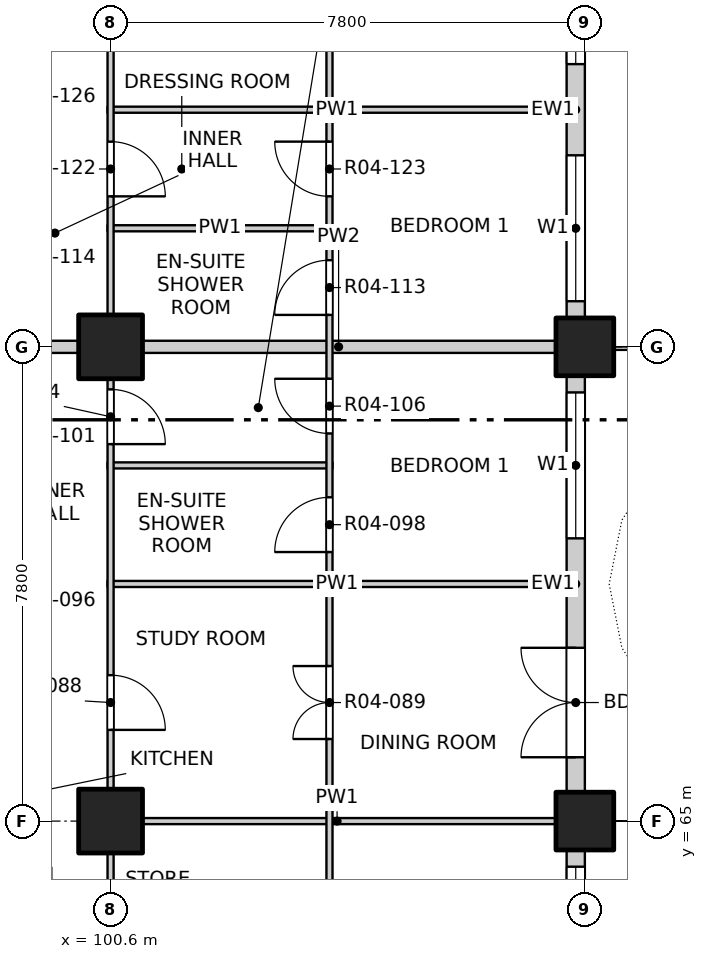
"""IFC4 building model, lengths in metres.
Left out: names, types, materials, properties, quantities, classifications, styles, units other than length and angle.
Written with IfcOpenShell. Run it as: python <this file> out.ifc"""

import sys

from ifc_helpers import new_model, si_unit, direction, frame, frame_2d, origin, origin_2d, place, context, subcontext, project, spatial, rectangle, extrude, element, fill, save


model = new_model("IFC4")
c1 = context("Model", 3, precision=1e-05, world=origin(), true_north=direction((0.0, 1.0)))
c2 = subcontext(c1, "Body", "Model", "MODEL_VIEW")
j1 = project(units=[si_unit("LENGTHUNIT", "METRE"), si_unit("PLANEANGLEUNIT", "RADIAN")], contexts=[c1])
p1 = place(None, origin())
s1 = spatial("IfcSite", under=j1, at=p1, CompositionType="ELEMENT")
p2 = place(p1, origin())
s2 = spatial("IfcBuilding", under=s1, at=p2, CompositionType="ELEMENT")
p3 = place(p2, frame((0.0, 0.0, 58.0)))
s3 = spatial("IfcBuildingStorey", under=s2, at=p3, CompositionType="ELEMENT", Elevation=58.0)
for number, where, z_axis, x_axis in (
    (1, (108.4, 65.0, -0.25), (0.0, 0.0, 1.0), (1.0, 0.0, 0.0)),
    (2, (108.4, 72.8, -0.25), (0.0, 0.0, 1.0), (1.0, 0.0, 0.0)),
):
    element("IfcColumn", number, at=place(p3, frame(where, z_axis=z_axis, x_axis=x_axis)), inside=s3, PredefinedType="COLUMN", context=c2, shape_type="SweptSolid", body=[
        extrude(rectangle(XDim=0.95, YDim=0.95, at=origin_2d()), origin(), (0.0, 0.0, 1.0), 3.4),
    ])
for number, where, z_axis, x_axis in (
    (3, (100.6, 65.0, -0.25), (0.0, 0.0, 1.0), (1.0, 0.0, 0.0)),
    (4, (100.6, 72.8, -0.25), (0.0, 0.0, 1.0), (1.0, 0.0, 0.0)),
):
    element("IfcColumn", number, at=place(p3, frame(where, z_axis=z_axis, x_axis=x_axis)), inside=s3, PredefinedType="COLUMN", context=c2, shape_type="SweptSolid", body=[
        extrude(rectangle(XDim=1.05, YDim=1.05, at=origin_2d()), origin(), (0.0, 0.0, 1.0), 3.4),
    ])
p4 = place(p3, frame((108.25, 57.675, 0.0), z_axis=(0.0, 0.0, 1.0), x_axis=(0.0, 1.0, 0.0)))
e5 = element("IfcWall", 5, at=p4, inside=s3, PredefinedType="SOLIDWALL", context=c2, shape_type="SweptSolid", body=[
    extrude(rectangle(XDim=6.85, YDim=0.3, at=frame_2d((3.425, 0.0))), origin(), (0.0, 0.0, 1.0), 2.7),
])
p5 = place(p4, frame((0.575, 0.0, 0.0)))
e6 = element("IfcOpeningElement", 6, at=p5, cuts=e5, PredefinedType="OPENING", context=c2, shape_type="SweptSolid", body=[
    extrude(rectangle(XDim=1.8, YDim=2.4, at=frame_2d((0.9, 1.2))), frame((0.0, 0.16, 0.0), z_axis=(0.0, -1.0, 0.0), x_axis=(1.0, 0.0, 0.0)), (0.0, 0.0, 1.0), 0.32),
])
p6 = place(p4, frame((4.175, 0.0, 0.9)))
e7 = element("IfcOpeningElement", 7, at=p6, cuts=e5, PredefinedType="OPENING", context=c2, shape_type="SweptSolid", body=[
    extrude(rectangle(XDim=2.4, YDim=1.8, at=frame_2d((1.2, 0.9))), frame((0.0, 0.16, 0.0), z_axis=(0.0, -1.0, 0.0), x_axis=(1.0, 0.0, 0.0)), (0.0, 0.0, 1.0), 0.32),
])
p7 = place(p3, frame((108.25, 65.475, 0.0), z_axis=(0.0, 0.0, 1.0), x_axis=(0.0, 1.0, 0.0)))
e8 = element("IfcWall", 8, at=p7, inside=s3, PredefinedType="SOLIDWALL", context=c2, shape_type="SweptSolid", body=[
    extrude(rectangle(XDim=6.85, YDim=0.3, at=frame_2d((3.425, 0.0))), origin(), (0.0, 0.0, 1.0), 2.7),
])
p8 = place(p7, frame((0.575, 0.0, 0.0)))
e9 = element("IfcOpeningElement", 9, at=p8, cuts=e8, PredefinedType="OPENING", context=c2, shape_type="SweptSolid", body=[
    extrude(rectangle(XDim=1.8, YDim=2.4, at=frame_2d((0.9, 1.2))), frame((0.0, 0.16, 0.0), z_axis=(0.0, -1.0, 0.0), x_axis=(1.0, 0.0, 0.0)), (0.0, 0.0, 1.0), 0.32),
])
p9 = place(p7, frame((4.175, 0.0, 0.9)))
e10 = element("IfcOpeningElement", 10, at=p9, cuts=e8, PredefinedType="OPENING", context=c2, shape_type="SweptSolid", body=[
    extrude(rectangle(XDim=2.4, YDim=1.8, at=frame_2d((1.2, 0.9))), frame((0.0, 0.16, 0.0), z_axis=(0.0, -1.0, 0.0), x_axis=(1.0, 0.0, 0.0)), (0.0, 0.0, 1.0), 0.32),
])
p10 = place(p3, frame((108.25, 73.275, 0.0), z_axis=(0.0, 0.0, 1.0), x_axis=(0.0, 1.0, 0.0)))
e11 = element("IfcWall", 11, at=p10, inside=s3, PredefinedType="SOLIDWALL", context=c2, shape_type="SweptSolid", body=[
    extrude(rectangle(XDim=6.85, YDim=0.3, at=frame_2d((3.425, 0.0))), origin(), (0.0, 0.0, 1.0), 2.7),
])
p11 = place(p10, frame((0.275, 0.0, 0.9)))
e12 = element("IfcOpeningElement", 12, at=p11, cuts=e11, PredefinedType="OPENING", context=c2, shape_type="SweptSolid", body=[
    extrude(rectangle(XDim=2.4, YDim=1.8, at=frame_2d((1.2, 0.9))), frame((0.0, 0.16, 0.0), z_axis=(0.0, -1.0, 0.0), x_axis=(1.0, 0.0, 0.0)), (0.0, 0.0, 1.0), 0.32),
])
p12 = place(p10, frame((4.175, 0.0, 0.9)))
e13 = element("IfcOpeningElement", 13, at=p12, cuts=e11, PredefinedType="OPENING", context=c2, shape_type="SweptSolid", body=[
    extrude(rectangle(XDim=2.4, YDim=1.8, at=frame_2d((1.2, 0.9))), frame((0.0, 0.16, 0.0), z_axis=(0.0, -1.0, 0.0), x_axis=(1.0, 0.0, 0.0)), (0.0, 0.0, 1.0), 0.32),
])
p13 = place(p3, frame((100.55, 65.0, 0.0), z_axis=(0.0, 0.0, 1.0), x_axis=(1.0, 0.0, 0.0)))
e14 = element("IfcWall", 14, at=p13, inside=s3, PredefinedType="PARTITIONING", context=c2, shape_type="SweptSolid", body=[
    extrude(rectangle(XDim=7.55, YDim=0.1, at=frame_2d((3.775, 0.0))), origin(), (0.0, 0.0, 1.0), 2.55),
])
p14 = place(p3, frame((100.55, 68.9, 0.0), z_axis=(0.0, 0.0, 1.0), x_axis=(1.0, 0.0, 0.0)))
e15 = element("IfcWall", 15, at=p14, inside=s3, PredefinedType="PARTITIONING", context=c2, shape_type="SweptSolid", body=[
    extrude(rectangle(XDim=7.55, YDim=0.1, at=frame_2d((3.775, 0.0))), origin(), (0.0, 0.0, 1.0), 3.15),
])
p15 = place(p3, frame((100.55, 70.85, 0.0), z_axis=(0.0, 0.0, 1.0), x_axis=(1.0, 0.0, 0.0)))
e16 = element("IfcWall", 16, at=p15, inside=s3, PredefinedType="PARTITIONING", context=c2, shape_type="SweptSolid", body=[
    extrude(rectangle(XDim=3.7, YDim=0.1, at=frame_2d((1.85, 0.0))), origin(), (0.0, 0.0, 1.0), 3.15),
])
p16 = place(p3, frame((96.6, 72.8, 0.0), z_axis=(0.0, 0.0, 1.0), x_axis=(1.0, 0.0, 0.0)))
e17 = element("IfcWall", 17, at=p16, inside=s3, PredefinedType="PARTITIONING", context=c2, shape_type="SweptSolid", body=[
    extrude(rectangle(XDim=4.0, YDim=0.2, at=frame_2d((2.0, 0.0))), origin(), (0.0, 0.0, 1.0), 3.15),
])
p17 = place(p3, frame((100.6, 72.8, 0.0), z_axis=(0.0, 0.0, 1.0), x_axis=(1.0, 0.0, 0.0)))
e18 = element("IfcWall", 18, at=p17, inside=s3, PredefinedType="PARTITIONING", context=c2, shape_type="SweptSolid", body=[
    extrude(rectangle(XDim=7.5, YDim=0.2, at=frame_2d((3.75, 0.0))), origin(), (0.0, 0.0, 1.0), 2.55),
])
p18 = place(p3, frame((100.55, 74.75, 0.0), z_axis=(0.0, 0.0, 1.0), x_axis=(1.0, 0.0, 0.0)))
e19 = element("IfcWall", 19, at=p18, inside=s3, PredefinedType="PARTITIONING", context=c2, shape_type="SweptSolid", body=[
    extrude(rectangle(XDim=3.7, YDim=0.1, at=frame_2d((1.85, 0.0))), origin(), (0.0, 0.0, 1.0), 3.15),
])
p19 = place(p3, frame((100.55, 76.7, 0.0), z_axis=(0.0, 0.0, 1.0), x_axis=(1.0, 0.0, 0.0)))
e20 = element("IfcWall", 20, at=p19, inside=s3, PredefinedType="PARTITIONING", context=c2, shape_type="SweptSolid", body=[
    extrude(rectangle(XDim=7.55, YDim=0.1, at=frame_2d((3.775, 0.0))), origin(), (0.0, 0.0, 1.0), 3.15),
])
p20 = place(p3, frame((100.6, 49.4, 0.0), z_axis=(0.0, 0.0, 1.0), x_axis=(0.0, 1.0, 0.0)))
e21 = element("IfcWall", 21, at=p20, inside=s3, PredefinedType="PARTITIONING", context=c2, shape_type="SweptSolid", body=[
    extrude(rectangle(XDim=31.2, YDim=0.1, at=frame_2d((15.6, 0.0))), origin(), (0.0, 0.0, 1.0), 3.15),
])
p21 = place(p20, frame((2.475, 0.0, 0.0)))
e22 = element("IfcOpeningElement", 22, at=p21, cuts=e21, PredefinedType="OPENING", context=c2, shape_type="SweptSolid", body=[
    extrude(rectangle(XDim=0.9, YDim=2.1, at=frame_2d((0.45, 1.05))), frame((0.0, 0.06, 0.0), z_axis=(0.0, -1.0, 0.0), x_axis=(1.0, 0.0, 0.0)), (0.0, 0.0, 1.0), 0.12),
])
p22 = place(p20, frame((5.4, 0.0, 0.0)))
e23 = element("IfcOpeningElement", 23, at=p22, cuts=e21, PredefinedType="OPENING", context=c2, shape_type="SweptSolid", body=[
    extrude(rectangle(XDim=0.9, YDim=2.1, at=frame_2d((0.45, 1.05))), frame((0.0, 0.06, 0.0), z_axis=(0.0, -1.0, 0.0), x_axis=(1.0, 0.0, 0.0)), (0.0, 0.0, 1.0), 0.12),
])
p23 = place(p20, frame((10.275, 0.0, 0.0)))
e24 = element("IfcOpeningElement", 24, at=p23, cuts=e21, PredefinedType="OPENING", context=c2, shape_type="SweptSolid", body=[
    extrude(rectangle(XDim=0.9, YDim=2.1, at=frame_2d((0.45, 1.05))), frame((0.0, 0.06, 0.0), z_axis=(0.0, -1.0, 0.0), x_axis=(1.0, 0.0, 0.0)), (0.0, 0.0, 1.0), 0.12),
])
p24 = place(p20, frame((13.2, 0.0, 0.0)))
e25 = element("IfcOpeningElement", 25, at=p24, cuts=e21, PredefinedType="OPENING", context=c2, shape_type="SweptSolid", body=[
    extrude(rectangle(XDim=0.9, YDim=2.1, at=frame_2d((0.45, 1.05))), frame((0.0, 0.06, 0.0), z_axis=(0.0, -1.0, 0.0), x_axis=(1.0, 0.0, 0.0)), (0.0, 0.0, 1.0), 0.12),
])
p25 = place(p20, frame((17.1, 0.0, 0.0)))
e26 = element("IfcOpeningElement", 26, at=p25, cuts=e21, PredefinedType="OPENING", context=c2, shape_type="SweptSolid", body=[
    extrude(rectangle(XDim=0.9, YDim=2.1, at=frame_2d((0.45, 1.05))), frame((0.0, 0.06, 0.0), z_axis=(0.0, -1.0, 0.0), x_axis=(1.0, 0.0, 0.0)), (0.0, 0.0, 1.0), 0.12),
])
p26 = place(p20, frame((21.8, 0.0, 0.0)))
e27 = element("IfcOpeningElement", 27, at=p26, cuts=e21, PredefinedType="OPENING", context=c2, shape_type="SweptSolid", body=[
    extrude(rectangle(XDim=0.9, YDim=2.1, at=frame_2d((0.45, 1.05))), frame((0.0, 0.06, 0.0), z_axis=(0.0, -1.0, 0.0), x_axis=(1.0, 0.0, 0.0)), (0.0, 0.0, 1.0), 0.12),
])
p27 = place(p20, frame((25.875, 0.0, 0.0)))
e28 = element("IfcOpeningElement", 28, at=p27, cuts=e21, PredefinedType="OPENING", context=c2, shape_type="SweptSolid", body=[
    extrude(rectangle(XDim=0.9, YDim=2.1, at=frame_2d((0.45, 1.05))), frame((0.0, 0.06, 0.0), z_axis=(0.0, -1.0, 0.0), x_axis=(1.0, 0.0, 0.0)), (0.0, 0.0, 1.0), 0.12),
])
p28 = place(p20, frame((28.8, 0.0, 0.0)))
e29 = element("IfcOpeningElement", 29, at=p28, cuts=e21, PredefinedType="OPENING", context=c2, shape_type="SweptSolid", body=[
    extrude(rectangle(XDim=0.9, YDim=2.1, at=frame_2d((0.45, 1.05))), frame((0.0, 0.06, 0.0), z_axis=(0.0, -1.0, 0.0), x_axis=(1.0, 0.0, 0.0)), (0.0, 0.0, 1.0), 0.12),
])
p29 = place(p3, frame((104.2, 41.9, 0.0), z_axis=(0.0, 0.0, 1.0), x_axis=(0.0, 1.0, 0.0)))
e30 = element("IfcWall", 30, at=p29, inside=s3, PredefinedType="PARTITIONING", context=c2, shape_type="SweptSolid", body=[
    extrude(rectangle(XDim=46.2, YDim=0.1, at=frame_2d((23.1, 0.0))), origin(), (0.0, 0.0, 1.0), 3.15),
])
p30 = place(p29, frame((1.05, 0.0, 0.0)))
e31 = element("IfcOpeningElement", 31, at=p30, cuts=e30, PredefinedType="OPENING", context=c2, shape_type="SweptSolid", body=[
    extrude(rectangle(XDim=1.2, YDim=2.1, at=frame_2d((0.6, 1.05))), frame((0.0, 0.06, 0.0), z_axis=(0.0, -1.0, 0.0), x_axis=(1.0, 0.0, 0.0)), (0.0, 0.0, 1.0), 0.12),
])
p31 = place(p29, frame((4.125, 0.0, 0.0)))
e32 = element("IfcOpeningElement", 32, at=p31, cuts=e30, PredefinedType="OPENING", context=c2, shape_type="SweptSolid", body=[
    extrude(rectangle(XDim=0.9, YDim=2.1, at=frame_2d((0.45, 1.05))), frame((0.0, 0.06, 0.0), z_axis=(0.0, -1.0, 0.0), x_axis=(1.0, 0.0, 0.0)), (0.0, 0.0, 1.0), 0.12),
])
p32 = place(p29, frame((6.075, 0.0, 0.0)))
e33 = element("IfcOpeningElement", 33, at=p32, cuts=e30, PredefinedType="OPENING", context=c2, shape_type="SweptSolid", body=[
    extrude(rectangle(XDim=0.9, YDim=2.1, at=frame_2d((0.45, 1.05))), frame((0.0, 0.06, 0.0), z_axis=(0.0, -1.0, 0.0), x_axis=(1.0, 0.0, 0.0)), (0.0, 0.0, 1.0), 0.12),
])
p33 = place(p29, frame((8.025, 0.0, 0.0)))
e34 = element("IfcOpeningElement", 34, at=p33, cuts=e30, PredefinedType="OPENING", context=c2, shape_type="SweptSolid", body=[
    extrude(rectangle(XDim=0.9, YDim=2.1, at=frame_2d((0.45, 1.05))), frame((0.0, 0.06, 0.0), z_axis=(0.0, -1.0, 0.0), x_axis=(1.0, 0.0, 0.0)), (0.0, 0.0, 1.0), 0.12),
])
p34 = place(p29, frame((9.975, 0.0, 0.0)))
e35 = element("IfcOpeningElement", 35, at=p34, cuts=e30, PredefinedType="OPENING", context=c2, shape_type="SweptSolid", body=[
    extrude(rectangle(XDim=0.9, YDim=2.1, at=frame_2d((0.45, 1.05))), frame((0.0, 0.06, 0.0), z_axis=(0.0, -1.0, 0.0), x_axis=(1.0, 0.0, 0.0)), (0.0, 0.0, 1.0), 0.12),
])
p35 = place(p29, frame((12.75, 0.0, 0.0)))
e36 = element("IfcOpeningElement", 36, at=p35, cuts=e30, PredefinedType="OPENING", context=c2, shape_type="SweptSolid", body=[
    extrude(rectangle(XDim=1.2, YDim=2.1, at=frame_2d((0.6, 1.05))), frame((0.0, 0.06, 0.0), z_axis=(0.0, -1.0, 0.0), x_axis=(1.0, 0.0, 0.0)), (0.0, 0.0, 1.0), 0.12),
])
p36 = place(p29, frame((15.825, 0.0, 0.0)))
e37 = element("IfcOpeningElement", 37, at=p36, cuts=e30, PredefinedType="OPENING", context=c2, shape_type="SweptSolid", body=[
    extrude(rectangle(XDim=0.9, YDim=2.1, at=frame_2d((0.45, 1.05))), frame((0.0, 0.06, 0.0), z_axis=(0.0, -1.0, 0.0), x_axis=(1.0, 0.0, 0.0)), (0.0, 0.0, 1.0), 0.12),
])
p37 = place(p29, frame((17.775, 0.0, 0.0)))
e38 = element("IfcOpeningElement", 38, at=p37, cuts=e30, PredefinedType="OPENING", context=c2, shape_type="SweptSolid", body=[
    extrude(rectangle(XDim=0.9, YDim=2.1, at=frame_2d((0.45, 1.05))), frame((0.0, 0.06, 0.0), z_axis=(0.0, -1.0, 0.0), x_axis=(1.0, 0.0, 0.0)), (0.0, 0.0, 1.0), 0.12),
])
p38 = place(p29, frame((20.55, 0.0, 0.0)))
e39 = element("IfcOpeningElement", 39, at=p38, cuts=e30, PredefinedType="OPENING", context=c2, shape_type="SweptSolid", body=[
    extrude(rectangle(XDim=1.2, YDim=2.1, at=frame_2d((0.6, 1.05))), frame((0.0, 0.06, 0.0), z_axis=(0.0, -1.0, 0.0), x_axis=(1.0, 0.0, 0.0)), (0.0, 0.0, 1.0), 0.12),
])
p39 = place(p29, frame((24.45, 0.0, 0.0)))
e40 = element("IfcOpeningElement", 40, at=p39, cuts=e30, PredefinedType="OPENING", context=c2, shape_type="SweptSolid", body=[
    extrude(rectangle(XDim=1.2, YDim=2.1, at=frame_2d((0.6, 1.05))), frame((0.0, 0.06, 0.0), z_axis=(0.0, -1.0, 0.0), x_axis=(1.0, 0.0, 0.0)), (0.0, 0.0, 1.0), 0.12),
])
p40 = place(p29, frame((27.525, 0.0, 0.0)))
e41 = element("IfcOpeningElement", 41, at=p40, cuts=e30, PredefinedType="OPENING", context=c2, shape_type="SweptSolid", body=[
    extrude(rectangle(XDim=0.9, YDim=2.1, at=frame_2d((0.45, 1.05))), frame((0.0, 0.06, 0.0), z_axis=(0.0, -1.0, 0.0), x_axis=(1.0, 0.0, 0.0)), (0.0, 0.0, 1.0), 0.12),
])
p41 = place(p29, frame((29.475, 0.0, 0.0)))
e42 = element("IfcOpeningElement", 42, at=p41, cuts=e30, PredefinedType="OPENING", context=c2, shape_type="SweptSolid", body=[
    extrude(rectangle(XDim=0.9, YDim=2.1, at=frame_2d((0.45, 1.05))), frame((0.0, 0.06, 0.0), z_axis=(0.0, -1.0, 0.0), x_axis=(1.0, 0.0, 0.0)), (0.0, 0.0, 1.0), 0.12),
])
p42 = place(p29, frame((31.425, 0.0, 0.0)))
e43 = element("IfcOpeningElement", 43, at=p42, cuts=e30, PredefinedType="OPENING", context=c2, shape_type="SweptSolid", body=[
    extrude(rectangle(XDim=0.9, YDim=2.1, at=frame_2d((0.45, 1.05))), frame((0.0, 0.06, 0.0), z_axis=(0.0, -1.0, 0.0), x_axis=(1.0, 0.0, 0.0)), (0.0, 0.0, 1.0), 0.12),
])
p43 = place(p29, frame((33.375, 0.0, 0.0)))
e44 = element("IfcOpeningElement", 44, at=p43, cuts=e30, PredefinedType="OPENING", context=c2, shape_type="SweptSolid", body=[
    extrude(rectangle(XDim=0.9, YDim=2.1, at=frame_2d((0.45, 1.05))), frame((0.0, 0.06, 0.0), z_axis=(0.0, -1.0, 0.0), x_axis=(1.0, 0.0, 0.0)), (0.0, 0.0, 1.0), 0.12),
])
p44 = place(p29, frame((36.15, 0.0, 0.0)))
e45 = element("IfcOpeningElement", 45, at=p44, cuts=e30, PredefinedType="OPENING", context=c2, shape_type="SweptSolid", body=[
    extrude(rectangle(XDim=1.2, YDim=2.1, at=frame_2d((0.6, 1.05))), frame((0.0, 0.06, 0.0), z_axis=(0.0, -1.0, 0.0), x_axis=(1.0, 0.0, 0.0)), (0.0, 0.0, 1.0), 0.12),
])
p45 = place(p29, frame((39.225, 0.0, 0.0)))
e46 = element("IfcOpeningElement", 46, at=p45, cuts=e30, PredefinedType="OPENING", context=c2, shape_type="SweptSolid", body=[
    extrude(rectangle(XDim=0.9, YDim=2.1, at=frame_2d((0.45, 1.05))), frame((0.0, 0.06, 0.0), z_axis=(0.0, -1.0, 0.0), x_axis=(1.0, 0.0, 0.0)), (0.0, 0.0, 1.0), 0.12),
])
p46 = place(p29, frame((41.175, 0.0, 0.0)))
e47 = element("IfcOpeningElement", 47, at=p46, cuts=e30, PredefinedType="OPENING", context=c2, shape_type="SweptSolid", body=[
    extrude(rectangle(XDim=0.9, YDim=2.1, at=frame_2d((0.45, 1.05))), frame((0.0, 0.06, 0.0), z_axis=(0.0, -1.0, 0.0), x_axis=(1.0, 0.0, 0.0)), (0.0, 0.0, 1.0), 0.12),
])
p47 = place(p29, frame((43.95, 0.0, 0.0)))
e48 = element("IfcOpeningElement", 48, at=p47, cuts=e30, PredefinedType="OPENING", context=c2, shape_type="SweptSolid", body=[
    extrude(rectangle(XDim=1.2, YDim=2.1, at=frame_2d((0.6, 1.05))), frame((0.0, 0.06, 0.0), z_axis=(0.0, -1.0, 0.0), x_axis=(1.0, 0.0, 0.0)), (0.0, 0.0, 1.0), 0.12),
])
p48 = place(p6, origin())
e49 = element("IfcWindow", 49, at=p48, inside=s3, PartitioningType="DOUBLE_PANEL_VERTICAL", PredefinedType="WINDOW", context=c2, shape_type="SweptSolid", body=[
    extrude(rectangle(XDim=2.4, YDim=1.8, at=frame_2d((1.2, 0.9))), frame((0.0, 0.03, 0.0), z_axis=(0.0, -1.0, 0.0), x_axis=(1.0, 0.0, 0.0)), (0.0, 0.0, 1.0), 0.06),
])
fill(e7, e49)
p49 = place(p8, origin())
e50 = element("IfcDoor", 50, at=p49, inside=s3, OperationType="DOUBLE_DOOR_SINGLE_SWING", PredefinedType="DOOR", context=c2, shape_type="SweptSolid", body=[
    extrude(rectangle(XDim=1.8, YDim=2.4, at=frame_2d((0.9, 1.2))), frame((0.0, 0.025, 0.0), z_axis=(0.0, -1.0, 0.0), x_axis=(1.0, 0.0, 0.0)), (0.0, 0.0, 1.0), 0.05),
])
fill(e9, e50)
p50 = place(p9, origin())
e51 = element("IfcWindow", 51, at=p50, inside=s3, PartitioningType="DOUBLE_PANEL_VERTICAL", PredefinedType="WINDOW", context=c2, shape_type="SweptSolid", body=[
    extrude(rectangle(XDim=2.4, YDim=1.8, at=frame_2d((1.2, 0.9))), frame((0.0, 0.03, 0.0), z_axis=(0.0, -1.0, 0.0), x_axis=(1.0, 0.0, 0.0)), (0.0, 0.0, 1.0), 0.06),
])
fill(e10, e51)
p51 = place(p11, origin())
e52 = element("IfcWindow", 52, at=p51, inside=s3, PartitioningType="DOUBLE_PANEL_VERTICAL", PredefinedType="WINDOW", context=c2, shape_type="SweptSolid", body=[
    extrude(rectangle(XDim=2.4, YDim=1.8, at=frame_2d((1.2, 0.9))), frame((0.0, 0.03, 0.0), z_axis=(0.0, -1.0, 0.0), x_axis=(1.0, 0.0, 0.0)), (0.0, 0.0, 1.0), 0.06),
])
fill(e12, e52)
p52 = place(p12, origin())
e53 = element("IfcWindow", 53, at=p52, inside=s3, PartitioningType="DOUBLE_PANEL_VERTICAL", PredefinedType="WINDOW", context=c2, shape_type="SweptSolid", body=[
    extrude(rectangle(XDim=2.4, YDim=1.8, at=frame_2d((1.2, 0.9))), frame((0.0, 0.03, 0.0), z_axis=(0.0, -1.0, 0.0), x_axis=(1.0, 0.0, 0.0)), (0.0, 0.0, 1.0), 0.06),
])
fill(e13, e53)
p53 = place(p25, origin())
e54 = element("IfcDoor", 54, at=p53, inside=s3, OperationType="SINGLE_SWING_RIGHT", PredefinedType="DOOR", context=c2, shape_type="SweptSolid", body=[
    extrude(rectangle(XDim=0.9, YDim=2.1, at=frame_2d((0.45, 1.05))), frame((0.0, 0.025, 0.0), z_axis=(0.0, -1.0, 0.0), x_axis=(1.0, 0.0, 0.0)), (0.0, 0.0, 1.0), 0.05),
])
fill(e26, e54)
p54 = place(p39, origin())
e55 = element("IfcDoor", 55, at=p54, inside=s3, OperationType="DOUBLE_DOOR_SINGLE_SWING", PredefinedType="DOOR", context=c2, shape_type="SweptSolid", body=[
    extrude(rectangle(XDim=1.2, YDim=2.1, at=frame_2d((0.6, 1.05))), frame((0.0, 0.025, 0.0), z_axis=(0.0, -1.0, 0.0), x_axis=(1.0, 0.0, 0.0)), (0.0, 0.0, 1.0), 0.05),
])
fill(e40, e55)
p55 = place(p40, origin())
e56 = element("IfcDoor", 56, at=p55, inside=s3, OperationType="SINGLE_SWING_LEFT", PredefinedType="DOOR", context=c2, shape_type="SweptSolid", body=[
    extrude(rectangle(XDim=0.9, YDim=2.1, at=frame_2d((0.45, 1.05))), frame((0.0, 0.025, 0.0), z_axis=(0.0, -1.0, 0.0), x_axis=(1.0, 0.0, 0.0)), (0.0, 0.0, 1.0), 0.05),
])
fill(e41, e56)
p56 = place(p26, origin())
e57 = element("IfcDoor", 57, at=p56, inside=s3, OperationType="SINGLE_SWING_RIGHT", PredefinedType="DOOR", context=c2, shape_type="SweptSolid", body=[
    extrude(rectangle(XDim=0.9, YDim=2.1, at=frame_2d((0.45, 1.05))), frame((0.0, 0.025, 0.0), z_axis=(0.0, -1.0, 0.0), x_axis=(1.0, 0.0, 0.0)), (0.0, 0.0, 1.0), 0.05),
])
fill(e27, e57)
p57 = place(p41, origin())
e58 = element("IfcDoor", 58, at=p57, inside=s3, OperationType="SINGLE_SWING_RIGHT", PredefinedType="DOOR", context=c2, shape_type="SweptSolid", body=[
    extrude(rectangle(XDim=0.9, YDim=2.1, at=frame_2d((0.45, 1.05))), frame((0.0, 0.025, 0.0), z_axis=(0.0, -1.0, 0.0), x_axis=(1.0, 0.0, 0.0)), (0.0, 0.0, 1.0), 0.05),
])
fill(e42, e58)
p58 = place(p42, origin())
e59 = element("IfcDoor", 59, at=p58, inside=s3, OperationType="SINGLE_SWING_LEFT", PredefinedType="DOOR", context=c2, shape_type="SweptSolid", body=[
    extrude(rectangle(XDim=0.9, YDim=2.1, at=frame_2d((0.45, 1.05))), frame((0.0, 0.025, 0.0), z_axis=(0.0, -1.0, 0.0), x_axis=(1.0, 0.0, 0.0)), (0.0, 0.0, 1.0), 0.05),
])
fill(e43, e59)
p59 = place(p27, origin())
e60 = element("IfcDoor", 60, at=p59, inside=s3, OperationType="SINGLE_SWING_RIGHT", PredefinedType="DOOR", context=c2, shape_type="SweptSolid", body=[
    extrude(rectangle(XDim=0.9, YDim=2.1, at=frame_2d((0.45, 1.05))), frame((0.0, 0.025, 0.0), z_axis=(0.0, -1.0, 0.0), x_axis=(1.0, 0.0, 0.0)), (0.0, 0.0, 1.0), 0.05),
])
fill(e28, e60)
p60 = place(p43, origin())
e61 = element("IfcDoor", 61, at=p60, inside=s3, OperationType="SINGLE_SWING_RIGHT", PredefinedType="DOOR", context=c2, shape_type="SweptSolid", body=[
    extrude(rectangle(XDim=0.9, YDim=2.1, at=frame_2d((0.45, 1.05))), frame((0.0, 0.025, 0.0), z_axis=(0.0, -1.0, 0.0), x_axis=(1.0, 0.0, 0.0)), (0.0, 0.0, 1.0), 0.05),
])
fill(e44, e61)
save(model, sys.argv[1])
